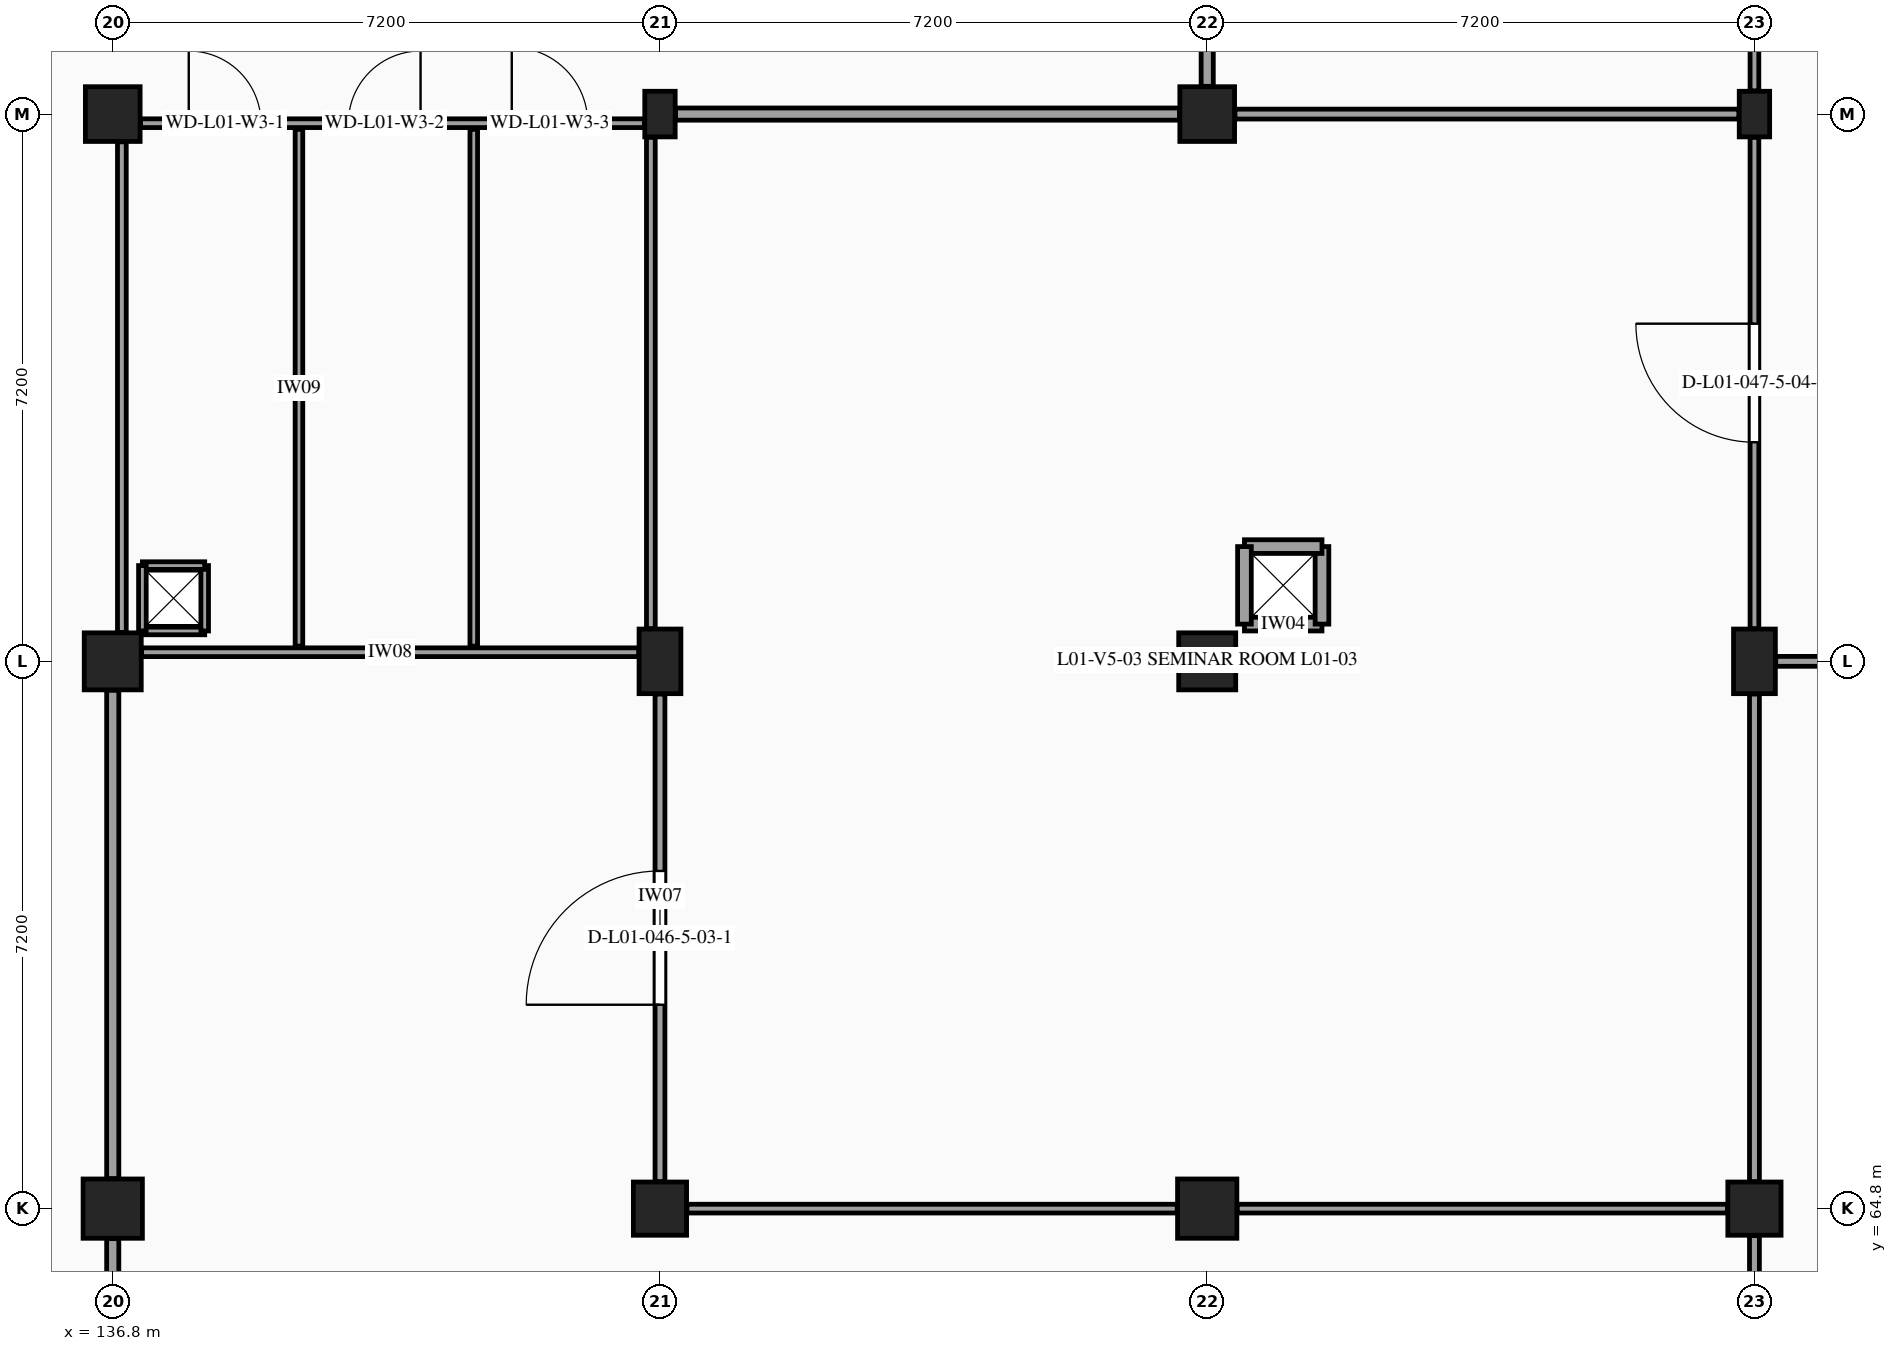
"""IFC4 building model, lengths in metres.
Left out: names, types, materials, properties, quantities, classifications, styles, units other than length and angle.
Written with IfcOpenShell. Run it as: python <this file> out.ifc"""

import sys

from ifc_helpers import new_model, si_unit, direction, frame, frame_2d, origin, origin_2d, place, context, subcontext, project, spatial, rectangle, extrude, element, fill, save


model = new_model("IFC4")
c1 = context("Model", 3, precision=1e-05, world=origin(), true_north=direction((0.0, 1.0)))
c2 = subcontext(c1, "Body", "Model", "MODEL_VIEW")
j1 = project(units=[si_unit("LENGTHUNIT", "METRE"), si_unit("PLANEANGLEUNIT", "RADIAN")], contexts=[c1])
p1 = place(None, origin())
s1 = spatial("IfcSite", under=j1, at=p1, CompositionType="ELEMENT")
p2 = place(p1, origin())
s2 = spatial("IfcBuilding", under=s1, at=p2, CompositionType="ELEMENT")
p3 = place(p2, frame((0.0, 0.0, 5.4)))
s3 = spatial("IfcBuildingStorey", under=s2, at=p3, CompositionType="ELEMENT", Elevation=5.4)
p4 = place(p3, frame((136.8, 64.8, 0.0), z_axis=(0.0, 0.0, 1.0), x_axis=(1.0, 0.0, 0.0)))
e1 = element("IfcColumn", 1, at=p4, inside=s3, PredefinedType="COLUMN", context=c2, shape_type="SweptSolid", body=[
    extrude(rectangle(XDim=0.78, YDim=0.78, at=origin_2d()), origin(), (0.0, 0.0, 1.0), 4.5),
])
p5 = place(p3, frame((136.8, 72.0, 0.0), z_axis=(0.0, 0.0, 1.0), x_axis=(1.0, 0.0, 0.0)))
e2 = element("IfcColumn", 2, at=p5, inside=s3, PredefinedType="COLUMN", context=c2, shape_type="SweptSolid", body=[
    extrude(rectangle(XDim=0.75, YDim=0.75, at=origin_2d()), origin(), (0.0, 0.0, 1.0), 4.5),
])
p6 = place(p3, frame((136.8, 79.2, 0.0), z_axis=(0.0, 0.0, 1.0), x_axis=(1.0, 0.0, 0.0)))
e3 = element("IfcColumn", 3, at=p6, inside=s3, PredefinedType="COLUMN", context=c2, shape_type="SweptSolid", body=[
    extrude(rectangle(XDim=0.72, YDim=0.72, at=origin_2d()), origin(), (0.0, 0.0, 1.0), 4.5),
])
p7 = place(p3, frame((144.0, 64.8, 0.0), z_axis=(0.0, 0.0, 1.0), x_axis=(1.0, 0.0, 0.0)))
e4 = element("IfcColumn", 4, at=p7, inside=s3, PredefinedType="COLUMN", context=c2, shape_type="SweptSolid", body=[
    extrude(rectangle(XDim=0.7, YDim=0.7, at=origin_2d()), origin(), (0.0, 0.0, 1.0), 4.5),
])
p8 = place(p3, frame((144.0, 72.0, 0.0), z_axis=(0.0, 0.0, 1.0), x_axis=(1.0, 0.0, 0.0)))
e5 = element("IfcColumn", 5, at=p8, inside=s3, PredefinedType="COLUMN", context=c2, shape_type="SweptSolid", body=[
    extrude(rectangle(XDim=0.55, YDim=0.85, at=origin_2d()), origin(), (0.0, 0.0, 1.0), 4.5),
])
p9 = place(p3, frame((144.0, 79.2, 0.0), z_axis=(0.0, 0.0, 1.0), x_axis=(1.0, 0.0, 0.0)))
e6 = element("IfcColumn", 6, at=p9, inside=s3, PredefinedType="PILASTER", context=c2, shape_type="SweptSolid", body=[
    extrude(rectangle(XDim=0.4, YDim=0.6, at=origin_2d()), origin(), (0.0, 0.0, 1.0), 4.5),
])
p10 = place(p3, frame((151.2, 64.8, 0.0), z_axis=(0.0, 0.0, 1.0), x_axis=(1.0, 0.0, 0.0)))
e7 = element("IfcColumn", 7, at=p10, inside=s3, PredefinedType="COLUMN", context=c2, shape_type="SweptSolid", body=[
    extrude(rectangle(XDim=0.78, YDim=0.78, at=origin_2d()), origin(), (0.0, 0.0, 1.0), 4.5),
])
p11 = place(p3, frame((151.2, 72.0, 0.0), z_axis=(0.0, 0.0, 1.0), x_axis=(1.0, 0.0, 0.0)))
e8 = element("IfcColumn", 8, at=p11, inside=s3, PredefinedType="COLUMN", context=c2, shape_type="SweptSolid", body=[
    extrude(rectangle(XDim=0.75, YDim=0.75, at=origin_2d()), origin(), (0.0, 0.0, 1.0), 4.5),
])
p12 = place(p3, frame((151.2, 79.2, 0.0), z_axis=(0.0, 0.0, 1.0), x_axis=(1.0, 0.0, 0.0)))
e9 = element("IfcColumn", 9, at=p12, inside=s3, PredefinedType="COLUMN", context=c2, shape_type="SweptSolid", body=[
    extrude(rectangle(XDim=0.72, YDim=0.72, at=origin_2d()), origin(), (0.0, 0.0, 1.0), 4.5),
])
p13 = place(p3, frame((158.4, 64.8, 0.0), z_axis=(0.0, 0.0, 1.0), x_axis=(1.0, 0.0, 0.0)))
e10 = element("IfcColumn", 10, at=p13, inside=s3, PredefinedType="COLUMN", context=c2, shape_type="SweptSolid", body=[
    extrude(rectangle(XDim=0.7, YDim=0.7, at=origin_2d()), origin(), (0.0, 0.0, 1.0), 4.5),
])
p14 = place(p3, frame((158.4, 72.0, 0.0), z_axis=(0.0, 0.0, 1.0), x_axis=(1.0, 0.0, 0.0)))
e11 = element("IfcColumn", 11, at=p14, inside=s3, PredefinedType="COLUMN", context=c2, shape_type="SweptSolid", body=[
    extrude(rectangle(XDim=0.55, YDim=0.85, at=origin_2d()), origin(), (0.0, 0.0, 1.0), 4.5),
])
p15 = place(p3, frame((158.4, 79.2, 0.0), z_axis=(0.0, 0.0, 1.0), x_axis=(1.0, 0.0, 0.0)))
e12 = element("IfcColumn", 12, at=p15, inside=s3, PredefinedType="PILASTER", context=c2, shape_type="SweptSolid", body=[
    extrude(rectangle(XDim=0.4, YDim=0.6, at=origin_2d()), origin(), (0.0, 0.0, 1.0), 4.5),
])
p16 = place(p3, frame((137.18, 72.12, 0.0), z_axis=(0.0, 0.0, 1.0), x_axis=(1.0, 0.0, 0.0)))
e13 = element("IfcWall", 13, at=p16, inside=s3, PredefinedType="PARTITIONING", context=c2, shape_type="SweptSolid", body=[
    extrude(rectangle(XDim=6.54, YDim=0.115, at=frame_2d((3.27, 0.0))), origin(), (0.0, 0.0, 1.0), 3.43),
])
p17 = place(p3, frame((137.165, 79.08, 0.0), z_axis=(0.0, 0.0, 1.0), x_axis=(1.0, 0.0, 0.0)))
e14 = element("IfcWall", 14, at=p17, inside=s3, PredefinedType="PARTITIONING", context=c2, shape_type="SweptSolid", body=[
    extrude(rectangle(XDim=6.63, YDim=0.115, at=frame_2d((3.315, 0.0))), origin(), (0.0, 0.0, 1.0), 3.43),
])
p18 = place(p17, frame((0.635, 0.0, 0.0)))
e15 = element("IfcOpeningElement", 15, at=p18, cuts=e14, PredefinedType="OPENING", context=c2, shape_type="SweptSolid", body=[
    extrude(rectangle(XDim=0.95, YDim=2.1, at=frame_2d((0.475, 1.05))), frame((0.0, 0.067, 0.0), z_axis=(0.0, -1.0, 0.0), x_axis=(1.0, 0.0, 0.0)), (0.0, 0.0, 1.0), 0.135),
])
p19 = place(p17, frame((2.735, 0.0, 0.0)))
e16 = element("IfcOpeningElement", 16, at=p19, cuts=e14, PredefinedType="OPENING", context=c2, shape_type="SweptSolid", body=[
    extrude(rectangle(XDim=0.95, YDim=2.1, at=frame_2d((0.475, 1.05))), frame((0.0, 0.067, 0.0), z_axis=(0.0, -1.0, 0.0), x_axis=(1.0, 0.0, 0.0)), (0.0, 0.0, 1.0), 0.135),
])
p20 = place(p17, frame((4.885, 0.0, 0.0)))
e17 = element("IfcOpeningElement", 17, at=p20, cuts=e14, PredefinedType="OPENING", context=c2, shape_type="SweptSolid", body=[
    extrude(rectangle(XDim=1.0, YDim=2.15, at=frame_2d((0.5, 1.075))), frame((0.0, 0.067, 0.0), z_axis=(0.0, -1.0, 0.0), x_axis=(1.0, 0.0, 0.0)), (0.0, 0.0, 1.0), 0.135),
])
p21 = place(p3, frame((136.92, 72.38, 0.0), z_axis=(0.0, 0.0, 1.0), x_axis=(0.0, 1.0, 0.0)))
e18 = element("IfcWall", 18, at=p21, inside=s3, PredefinedType="PARTITIONING", context=c2, shape_type="SweptSolid", body=[
    extrude(rectangle(XDim=6.455, YDim=0.115, at=frame_2d((3.228, 0.0))), origin(), (0.0, 0.0, 1.0), 3.515),
])
p22 = place(p3, frame((143.88, 72.43, 0.0), z_axis=(0.0, 0.0, 1.0), x_axis=(0.0, 1.0, 0.0)))
e19 = element("IfcWall", 19, at=p22, inside=s3, PredefinedType="PARTITIONING", context=c2, shape_type="SweptSolid", body=[
    extrude(rectangle(XDim=6.465, YDim=0.115, at=frame_2d((3.232, 0.0))), origin(), (0.0, 0.0, 1.0), 3.515),
])
for number, where, z_axis, x_axis in (
    (20, (139.25, 72.2, 0.0), (0.0, 0.0, 1.0), (0.0, 1.0, 0.0)),
    (21, (141.55, 72.2, 0.0), (0.0, 0.0, 1.0), (0.0, 1.0, 0.0)),
):
    element("IfcWall", number, at=place(p3, frame(where, z_axis=z_axis, x_axis=x_axis)), inside=s3, PredefinedType="PARTITIONING", context=c2, shape_type="SweptSolid", body=[
        extrude(rectangle(XDim=6.8, YDim=0.1, at=frame_2d((3.4, 0.0))), origin(), (0.0, 0.0, 1.0), 4.21),
    ])
for number, where, z_axis, x_axis in (
    (22, (151.69, 72.49, 0.0), (0.0, 0.0, 1.0), (1.0, 0.0, 0.0)),
    (23, (152.71, 72.49, 0.0), (0.0, 0.0, 1.0), (0.0, 1.0, 0.0)),
    (24, (152.71, 73.51, 0.0), (0.0, 0.0, 1.0), (-1.0, 0.0, 0.0)),
    (25, (151.69, 73.51, 0.0), (0.0, 0.0, 1.0), (0.0, -1.0, 0.0)),
):
    element("IfcWall", number, at=place(p3, frame(where, z_axis=z_axis, x_axis=x_axis)), inside=s3, PredefinedType="PARTITIONING", context=c2, shape_type="SweptSolid", body=[
        extrude(rectangle(XDim=1.02, YDim=0.18, at=frame_2d((0.51, 0.0))), origin(), (0.0, 0.0, 1.0), 4.21),
    ])
p23 = place(p3, frame((137.19, 72.4, 0.0), z_axis=(0.0, 0.0, 1.0), x_axis=(1.0, 0.0, 0.0)))
e26 = element("IfcWall", 26, at=p23, inside=s3, PredefinedType="PARTITIONING", context=c2, shape_type="SweptSolid", body=[
    extrude(rectangle(XDim=0.82, YDim=0.1, at=frame_2d((0.41, 0.0))), origin(), (0.0, 0.0, 1.0), 4.21),
])
p24 = place(p3, frame((138.01, 72.4, 0.0), z_axis=(0.0, 0.0, 1.0), x_axis=(0.0, 1.0, 0.0)))
e27 = element("IfcWall", 27, at=p24, inside=s3, PredefinedType="PARTITIONING", context=c2, shape_type="SweptSolid", body=[
    extrude(rectangle(XDim=0.86, YDim=0.1, at=frame_2d((0.43, 0.0))), origin(), (0.0, 0.0, 1.0), 4.21),
])
p25 = place(p3, frame((138.01, 73.26, 0.0), z_axis=(0.0, 0.0, 1.0), x_axis=(-1.0, 0.0, 0.0)))
e28 = element("IfcWall", 28, at=p25, inside=s3, PredefinedType="PARTITIONING", context=c2, shape_type="SweptSolid", body=[
    extrude(rectangle(XDim=0.82, YDim=0.1, at=frame_2d((0.41, 0.0))), origin(), (0.0, 0.0, 1.0), 4.21),
])
p26 = place(p3, frame((137.19, 73.26, 0.0), z_axis=(0.0, 0.0, 1.0), x_axis=(0.0, -1.0, 0.0)))
e29 = element("IfcWall", 29, at=p26, inside=s3, PredefinedType="PARTITIONING", context=c2, shape_type="SweptSolid", body=[
    extrude(rectangle(XDim=0.86, YDim=0.1, at=frame_2d((0.43, 0.0))), origin(), (0.0, 0.0, 1.0), 4.21),
])
p27 = place(p3, frame((136.8, 58.13, 0.0), z_axis=(0.0, 0.0, 1.0), x_axis=(0.0, 1.0, 0.0)))
e30 = element("IfcWall", 30, at=p27, inside=s3, PredefinedType="PARTITIONING", context=c2, shape_type="SweptSolid", body=[
    extrude(rectangle(XDim=6.275, YDim=0.16, at=frame_2d((3.138, 0.0))), origin(), (0.0, 0.0, 1.0), 3.525),
])
p28 = place(p27, frame((2.663, 0.0, 0.0)))
e31 = element("IfcOpeningElement", 31, at=p28, cuts=e30, PredefinedType="OPENING", context=c2, shape_type="SweptSolid", body=[
    extrude(rectangle(XDim=0.95, YDim=2.15, at=frame_2d((0.475, 1.075))), frame((0.0, 0.09, 0.0), z_axis=(0.0, -1.0, 0.0), x_axis=(1.0, 0.0, 0.0)), (0.0, 0.0, 1.0), 0.18),
])
p29 = place(p3, frame((136.8, 65.195, 0.0), z_axis=(0.0, 0.0, 1.0), x_axis=(0.0, 1.0, 0.0)))
e32 = element("IfcWall", 32, at=p29, inside=s3, PredefinedType="PARTITIONING", context=c2, shape_type="SweptSolid", body=[
    extrude(rectangle(XDim=6.425, YDim=0.16, at=frame_2d((3.212, 0.0))), origin(), (0.0, 0.0, 1.0), 3.52),
])
p30 = place(p3, frame((144.0, 65.155, 0.0), z_axis=(0.0, 0.0, 1.0), x_axis=(0.0, 1.0, 0.0)))
e33 = element("IfcWall", 33, at=p30, inside=s3, PredefinedType="PARTITIONING", context=c2, shape_type="SweptSolid", body=[
    extrude(rectangle(XDim=6.415, YDim=0.13, at=frame_2d((3.208, 0.0))), origin(), (0.0, 0.0, 1.0), 3.52),
])
p31 = place(p30, frame((2.327, 0.0, 0.0)))
e34 = element("IfcOpeningElement", 34, at=p31, cuts=e33, PredefinedType="OPENING", context=c2, shape_type="SweptSolid", body=[
    extrude(rectangle(XDim=1.76, YDim=2.3, at=frame_2d((0.88, 1.15))), frame((0.0, 0.075, 0.0), z_axis=(0.0, -1.0, 0.0), x_axis=(1.0, 0.0, 0.0)), (0.0, 0.0, 1.0), 0.15),
])
p32 = place(p3, frame((144.355, 64.8, 0.0), z_axis=(0.0, 0.0, 1.0), x_axis=(1.0, 0.0, 0.0)))
e35 = element("IfcWall", 35, at=p32, inside=s3, PredefinedType="PARTITIONING", context=c2, shape_type="SweptSolid", body=[
    extrude(rectangle(XDim=6.45, YDim=0.115, at=frame_2d((3.225, 0.0))), origin(), (0.0, 0.0, 1.0), 3.46),
])
p33 = place(p3, frame((144.205, 79.2, 0.0), z_axis=(0.0, 0.0, 1.0), x_axis=(1.0, 0.0, 0.0)))
e36 = element("IfcWall", 36, at=p33, inside=s3, PredefinedType="PARTITIONING", context=c2, shape_type="SweptSolid", body=[
    extrude(rectangle(XDim=6.63, YDim=0.16, at=frame_2d((3.315, 0.0))), origin(), (0.0, 0.0, 1.0), 3.46),
])
p34 = place(p3, frame((151.2, 79.565, 0.0), z_axis=(0.0, 0.0, 1.0), x_axis=(0.0, 1.0, 0.0)))
e37 = element("IfcWall", 37, at=p34, inside=s3, PredefinedType="PARTITIONING", context=c2, shape_type="SweptSolid", body=[
    extrude(rectangle(XDim=6.48, YDim=0.16, at=frame_2d((3.24, 0.0))), origin(), (0.0, 0.0, 1.0), 3.515),
])
p35 = place(p34, frame((2.55, 0.0, 0.0)))
e38 = element("IfcOpeningElement", 38, at=p35, cuts=e37, PredefinedType="OPENING", context=c2, shape_type="SweptSolid", body=[
    extrude(rectangle(XDim=1.38, YDim=2.22, at=frame_2d((0.69, 1.11))), frame((0.0, 0.09, 0.0), z_axis=(0.0, -1.0, 0.0), x_axis=(1.0, 0.0, 0.0)), (0.0, 0.0, 1.0), 0.18),
])
p36 = place(p3, frame((158.4, 58.13, 0.0), z_axis=(0.0, 0.0, 1.0), x_axis=(0.0, 1.0, 0.0)))
e39 = element("IfcWall", 39, at=p36, inside=s3, PredefinedType="PARTITIONING", context=c2, shape_type="SweptSolid", body=[
    extrude(rectangle(XDim=6.315, YDim=0.13, at=frame_2d((3.158, 0.0))), origin(), (0.0, 0.0, 1.0), 3.525),
])
p37 = place(p36, frame((2.198, 0.0, 0.0)))
e40 = element("IfcOpeningElement", 40, at=p37, cuts=e39, PredefinedType="OPENING", context=c2, shape_type="SweptSolid", body=[
    extrude(rectangle(XDim=1.92, YDim=2.35, at=frame_2d((0.96, 1.175))), frame((0.0, 0.075, 0.0), z_axis=(0.0, -1.0, 0.0), x_axis=(1.0, 0.0, 0.0)), (0.0, 0.0, 1.0), 0.15),
])
p38 = place(p3, frame((151.595, 64.8, 0.0), z_axis=(0.0, 0.0, 1.0), x_axis=(1.0, 0.0, 0.0)))
e41 = element("IfcWall", 41, at=p38, inside=s3, PredefinedType="PARTITIONING", context=c2, shape_type="SweptSolid", body=[
    extrude(rectangle(XDim=6.45, YDim=0.115, at=frame_2d((3.225, 0.0))), origin(), (0.0, 0.0, 1.0), 3.47),
])
p39 = place(p3, frame((158.4, 65.155, 0.0), z_axis=(0.0, 0.0, 1.0), x_axis=(0.0, 1.0, 0.0)))
e42 = element("IfcWall", 42, at=p39, inside=s3, PredefinedType="PARTITIONING", context=c2, shape_type="SweptSolid", body=[
    extrude(rectangle(XDim=6.415, YDim=0.13, at=frame_2d((3.208, 0.0))), origin(), (0.0, 0.0, 1.0), 3.52),
])
p40 = place(p3, frame((158.4, 72.43, 0.0), z_axis=(0.0, 0.0, 1.0), x_axis=(0.0, 1.0, 0.0)))
e43 = element("IfcWall", 43, at=p40, inside=s3, PredefinedType="PARTITIONING", context=c2, shape_type="SweptSolid", body=[
    extrude(rectangle(XDim=6.465, YDim=0.115, at=frame_2d((3.232, 0.0))), origin(), (0.0, 0.0, 1.0), 3.515),
])
p41 = place(p40, frame((2.452, 0.0, 0.0)))
e44 = element("IfcOpeningElement", 44, at=p41, cuts=e43, PredefinedType="OPENING", context=c2, shape_type="SweptSolid", body=[
    extrude(rectangle(XDim=1.56, YDim=2.25, at=frame_2d((0.78, 1.125))), frame((0.0, 0.067, 0.0), z_axis=(0.0, -1.0, 0.0), x_axis=(1.0, 0.0, 0.0)), (0.0, 0.0, 1.0), 0.135),
])
p42 = place(p3, frame((151.565, 79.2, 0.0), z_axis=(0.0, 0.0, 1.0), x_axis=(1.0, 0.0, 0.0)))
e45 = element("IfcWall", 45, at=p42, inside=s3, PredefinedType="PARTITIONING", context=c2, shape_type="SweptSolid", body=[
    extrude(rectangle(XDim=6.63, YDim=0.13, at=frame_2d((3.315, 0.0))), origin(), (0.0, 0.0, 1.0), 3.47),
])
p43 = place(p3, frame((158.4, 79.505, 0.0), z_axis=(0.0, 0.0, 1.0), x_axis=(0.0, 1.0, 0.0)))
e46 = element("IfcWall", 46, at=p43, inside=s3, PredefinedType="PARTITIONING", context=c2, shape_type="SweptSolid", body=[
    extrude(rectangle(XDim=6.5, YDim=0.115, at=frame_2d((3.25, 0.0))), origin(), (0.0, 0.0, 1.0), 3.515),
])
p44 = place(p3, frame((158.68, 72.0, 0.0), z_axis=(0.0, 0.0, 1.0), x_axis=(1.0, 0.0, 0.0)))
e47 = element("IfcWall", 47, at=p44, inside=s3, PredefinedType="PARTITIONING", context=c2, shape_type="SweptSolid", body=[
    extrude(rectangle(XDim=6.54, YDim=0.13, at=frame_2d((3.27, 0.0))), origin(), (0.0, 0.0, 1.0), 3.485),
])
p45 = place(p18, origin())
e48 = element("IfcDoor", 48, at=p45, inside=s3, OperationType="SINGLE_SWING_LEFT", PredefinedType="DOOR", context=c2, shape_type="SweptSolid", body=[
    extrude(rectangle(XDim=0.95, YDim=2.1, at=frame_2d((0.475, 1.05))), frame((0.0, 0.025, 0.0), z_axis=(0.0, -1.0, 0.0), x_axis=(1.0, 0.0, 0.0)), (0.0, 0.0, 1.0), 0.05),
])
fill(e15, e48)
p46 = place(p19, origin())
e49 = element("IfcDoor", 49, at=p46, inside=s3, OperationType="SINGLE_SWING_RIGHT", PredefinedType="DOOR", context=c2, shape_type="SweptSolid", body=[
    extrude(rectangle(XDim=0.95, YDim=2.1, at=frame_2d((0.475, 1.05))), frame((0.0, 0.025, 0.0), z_axis=(0.0, -1.0, 0.0), x_axis=(1.0, 0.0, 0.0)), (0.0, 0.0, 1.0), 0.05),
])
fill(e16, e49)
p47 = place(p20, origin())
e50 = element("IfcDoor", 50, at=p47, inside=s3, OperationType="SINGLE_SWING_LEFT", PredefinedType="DOOR", context=c2, shape_type="SweptSolid", body=[
    extrude(rectangle(XDim=1.0, YDim=2.15, at=frame_2d((0.5, 1.075))), frame((0.0, 0.025, 0.0), z_axis=(0.0, -1.0, 0.0), x_axis=(1.0, 0.0, 0.0)), (0.0, 0.0, 1.0), 0.05),
])
fill(e17, e50)
p48 = place(p31, origin())
e51 = element("IfcDoor", 51, at=p48, inside=s3, OperationType="SINGLE_SWING_LEFT", PredefinedType="DOOR", context=c2, shape_type="SweptSolid", body=[
    extrude(rectangle(XDim=1.76, YDim=2.3, at=frame_2d((0.88, 1.15))), frame((0.0, 0.025, 0.0), z_axis=(0.0, -1.0, 0.0), x_axis=(1.0, 0.0, 0.0)), (0.0, 0.0, 1.0), 0.05),
])
fill(e34, e51)
p49 = place(p41, origin())
e52 = element("IfcDoor", 52, at=p49, inside=s3, OperationType="SINGLE_SWING_RIGHT", PredefinedType="DOOR", context=c2, shape_type="SweptSolid", body=[
    extrude(rectangle(XDim=1.56, YDim=2.25, at=frame_2d((0.78, 1.125))), frame((0.0, 0.025, 0.0), z_axis=(0.0, -1.0, 0.0), x_axis=(1.0, 0.0, 0.0)), (0.0, 0.0, 1.0), 0.05),
])
fill(e44, e52)
save(model, sys.argv[1])
